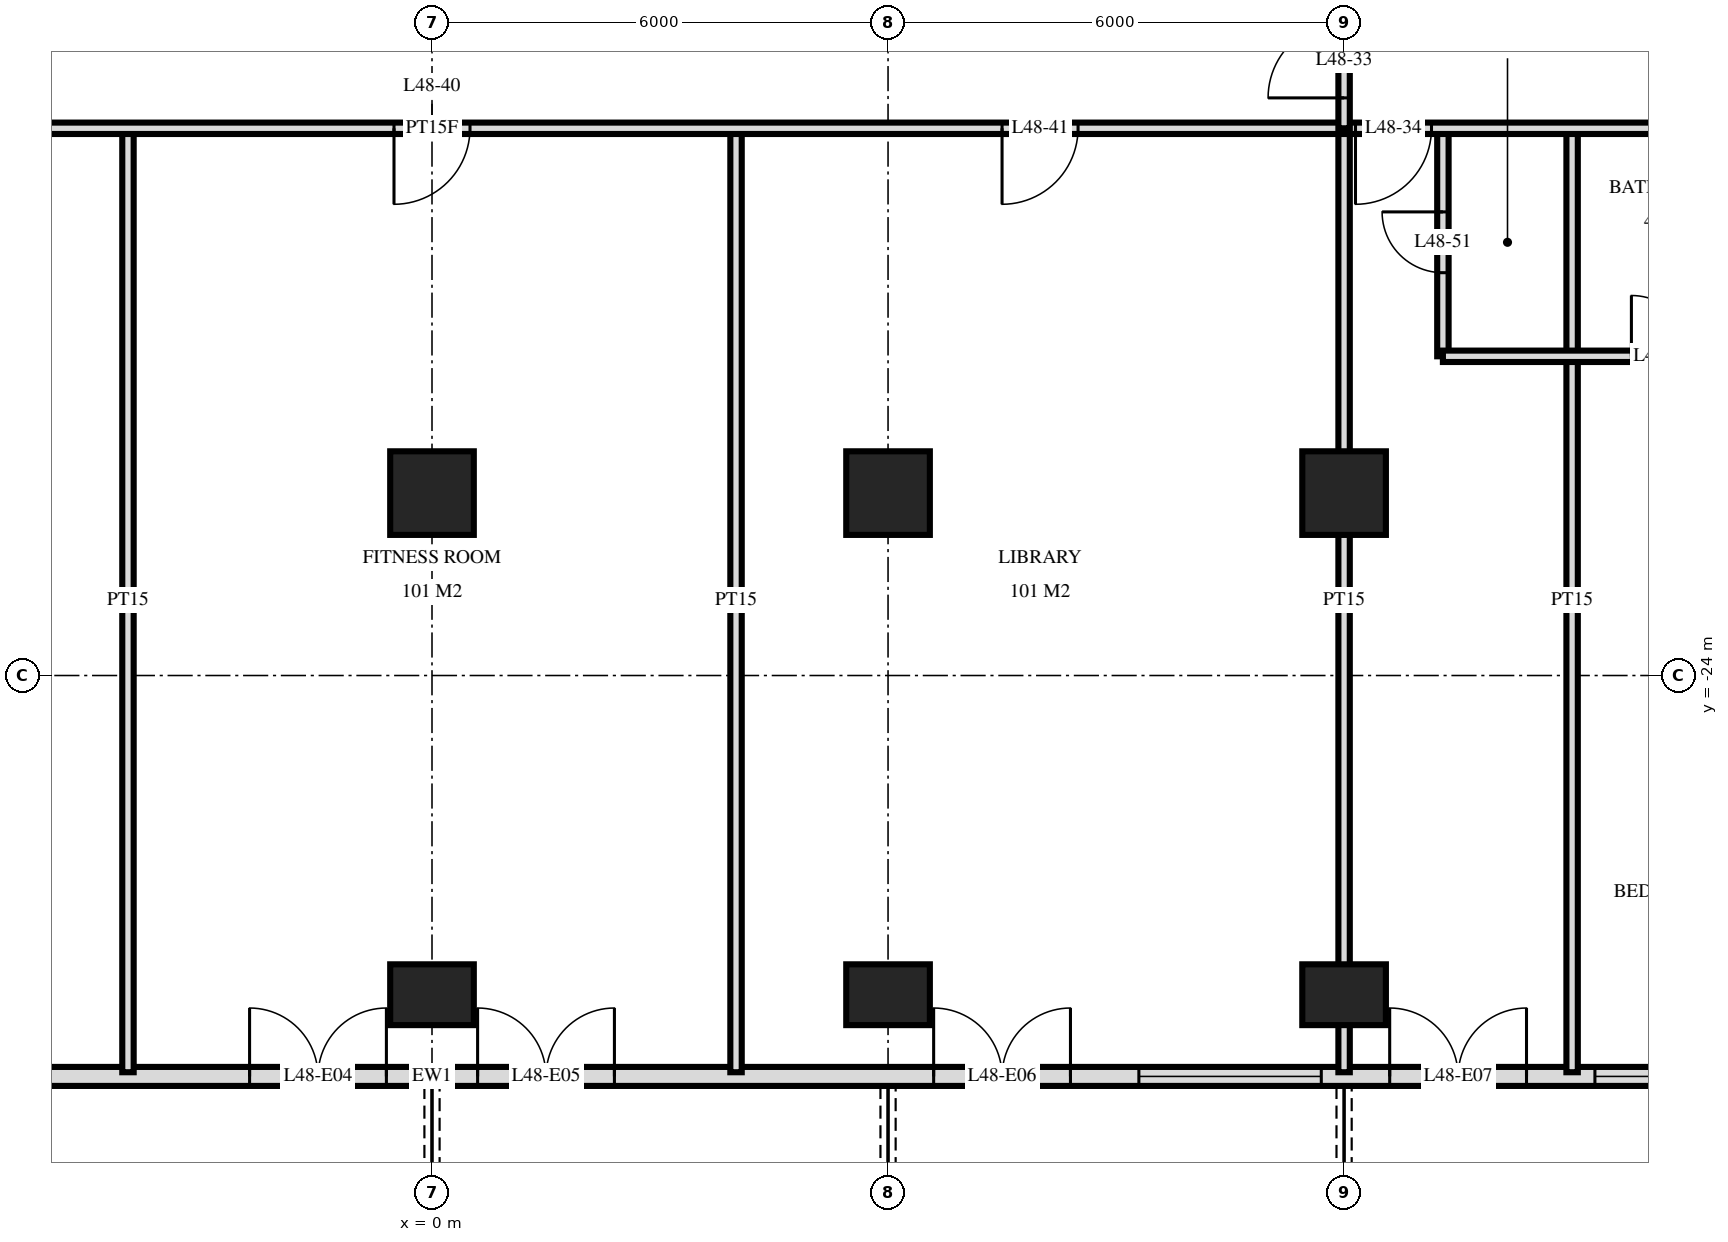
"""IFC4 building model, lengths in metres.
Left out: names, types, materials, properties, quantities, classifications, styles, units other than length and angle.
Written with IfcOpenShell. Run it as: python <this file> out.ifc"""

import sys

from ifc_helpers import new_model, si_unit, direction, frame, frame_2d, origin, origin_2d, place, context, subcontext, project, spatial, rectangle, extrude, element, fill, save


model = new_model("IFC4")
c1 = context("Model", 3, precision=1e-05, world=origin(), true_north=direction((0.0, 1.0)))
c2 = subcontext(c1, "Body", "Model", "MODEL_VIEW")
j1 = project(units=[si_unit("LENGTHUNIT", "METRE"), si_unit("PLANEANGLEUNIT", "RADIAN")], contexts=[c1])
p1 = place(None, origin())
s1 = spatial("IfcSite", under=j1, at=p1, CompositionType="ELEMENT")
p2 = place(p1, origin())
s2 = spatial("IfcBuilding", under=s1, at=p2, CompositionType="ELEMENT")
p3 = place(p2, frame((0.0, 0.0, 187.1)))
s3 = spatial("IfcBuildingStorey", under=s2, at=p3, CompositionType="ELEMENT", Elevation=187.1)
p4 = place(p3, frame((0.0, -28.2, 0.0), z_axis=(0.0, 0.0, 1.0), x_axis=(1.0, 0.0, 0.0)))
e1 = element("IfcColumn", 1, at=p4, inside=s3, PredefinedType="COLUMN", context=c2, shape_type="SweptSolid", body=[
    extrude(rectangle(XDim=1.1, YDim=0.8, at=origin_2d()), origin(), (0.0, 0.0, 1.0), 3.5),
])
p5 = place(p3, frame((0.0, -21.6, 0.0), z_axis=(0.0, 0.0, 1.0), x_axis=(1.0, 0.0, 0.0)))
e2 = element("IfcColumn", 2, at=p5, inside=s3, PredefinedType="COLUMN", context=c2, shape_type="SweptSolid", body=[
    extrude(rectangle(XDim=1.1, YDim=1.1, at=origin_2d()), origin(), (0.0, 0.0, 1.0), 3.5),
])
p6 = place(p3, frame((6.0, -28.2, 0.0), z_axis=(0.0, 0.0, 1.0), x_axis=(1.0, 0.0, 0.0)))
e3 = element("IfcColumn", 3, at=p6, inside=s3, PredefinedType="COLUMN", context=c2, shape_type="SweptSolid", body=[
    extrude(rectangle(XDim=1.1, YDim=0.8, at=origin_2d()), origin(), (0.0, 0.0, 1.0), 3.5),
])
p7 = place(p3, frame((6.0, -21.6, 0.0), z_axis=(0.0, 0.0, 1.0), x_axis=(1.0, 0.0, 0.0)))
e4 = element("IfcColumn", 4, at=p7, inside=s3, PredefinedType="COLUMN", context=c2, shape_type="SweptSolid", body=[
    extrude(rectangle(XDim=1.1, YDim=1.1, at=origin_2d()), origin(), (0.0, 0.0, 1.0), 3.5),
])
p8 = place(p3, frame((12.0, -28.2, 0.0), z_axis=(0.0, 0.0, 1.0), x_axis=(1.0, 0.0, 0.0)))
e5 = element("IfcColumn", 5, at=p8, inside=s3, PredefinedType="COLUMN", context=c2, shape_type="SweptSolid", body=[
    extrude(rectangle(XDim=1.1, YDim=0.8, at=origin_2d()), origin(), (0.0, 0.0, 1.0), 3.5),
])
p9 = place(p3, frame((12.0, -21.6, 0.0), z_axis=(0.0, 0.0, 1.0), x_axis=(1.0, 0.0, 0.0)))
e6 = element("IfcColumn", 6, at=p9, inside=s3, PredefinedType="COLUMN", context=c2, shape_type="SweptSolid", body=[
    extrude(rectangle(XDim=1.1, YDim=1.1, at=origin_2d()), origin(), (0.0, 0.0, 1.0), 3.5),
])
p10 = place(p3, frame((-22.475, -29.275, 0.0), z_axis=(0.0, 0.0, 1.0), x_axis=(1.0, 0.0, 0.0)))
e7 = element("IfcWall", 7, at=p10, inside=s3, PredefinedType="SOLIDWALL", context=c2, shape_type="SweptSolid", body=[
    extrude(rectangle(XDim=44.951, YDim=0.25, at=frame_2d((22.475, 0.0))), origin(), (0.0, 0.0, 1.0), 3.22),
])
p11 = place(p10, frame((0.575, 0.0, 0.0)))
e8 = element("IfcOpeningElement", 8, at=p11, cuts=e7, PredefinedType="OPENING", context=c2, shape_type="SweptSolid", body=[
    extrude(rectangle(XDim=1.8, YDim=2.4, at=frame_2d((0.9, 1.2))), frame((0.0, 0.135, 0.0), z_axis=(0.0, -1.0, 0.0), x_axis=(1.0, 0.0, 0.0)), (0.0, 0.0, 1.0), 0.27),
])
p12 = place(p10, frame((4.775, 0.0, 0.9)))
e9 = element("IfcOpeningElement", 9, at=p12, cuts=e7, PredefinedType="OPENING", context=c2, shape_type="SweptSolid", body=[
    extrude(rectangle(XDim=2.4, YDim=1.5, at=frame_2d((1.2, 0.75))), frame((0.0, 0.135, 0.0), z_axis=(0.0, -1.0, 0.0), x_axis=(1.0, 0.0, 0.0)), (0.0, 0.0, 1.0), 0.27),
])
p13 = place(p10, frame((8.075, 0.0, 0.0)))
e10 = element("IfcOpeningElement", 10, at=p13, cuts=e7, PredefinedType="OPENING", context=c2, shape_type="SweptSolid", body=[
    extrude(rectangle(XDim=1.8, YDim=2.4, at=frame_2d((0.9, 1.2))), frame((0.0, 0.135, 0.0), z_axis=(0.0, -1.0, 0.0), x_axis=(1.0, 0.0, 0.0)), (0.0, 0.0, 1.0), 0.27),
])
p14 = place(p10, frame((11.075, 0.0, 0.0)))
e11 = element("IfcOpeningElement", 11, at=p14, cuts=e7, PredefinedType="OPENING", context=c2, shape_type="SweptSolid", body=[
    extrude(rectangle(XDim=1.8, YDim=2.4, at=frame_2d((0.9, 1.2))), frame((0.0, 0.135, 0.0), z_axis=(0.0, -1.0, 0.0), x_axis=(1.0, 0.0, 0.0)), (0.0, 0.0, 1.0), 0.27),
])
p15 = place(p10, frame((13.775, 0.0, 0.9)))
e12 = element("IfcOpeningElement", 12, at=p15, cuts=e7, PredefinedType="OPENING", context=c2, shape_type="SweptSolid", body=[
    extrude(rectangle(XDim=2.4, YDim=1.5, at=frame_2d((1.2, 0.75))), frame((0.0, 0.135, 0.0), z_axis=(0.0, -1.0, 0.0), x_axis=(1.0, 0.0, 0.0)), (0.0, 0.0, 1.0), 0.27),
])
p16 = place(p10, frame((20.075, 0.0, 0.0)))
e13 = element("IfcOpeningElement", 13, at=p16, cuts=e7, PredefinedType="OPENING", context=c2, shape_type="SweptSolid", body=[
    extrude(rectangle(XDim=1.8, YDim=2.4, at=frame_2d((0.9, 1.2))), frame((0.0, 0.135, 0.0), z_axis=(0.0, -1.0, 0.0), x_axis=(1.0, 0.0, 0.0)), (0.0, 0.0, 1.0), 0.27),
])
p17 = place(p10, frame((23.075, 0.0, 0.0)))
e14 = element("IfcOpeningElement", 14, at=p17, cuts=e7, PredefinedType="OPENING", context=c2, shape_type="SweptSolid", body=[
    extrude(rectangle(XDim=1.8, YDim=2.4, at=frame_2d((0.9, 1.2))), frame((0.0, 0.135, 0.0), z_axis=(0.0, -1.0, 0.0), x_axis=(1.0, 0.0, 0.0)), (0.0, 0.0, 1.0), 0.27),
])
p18 = place(p10, frame((29.075, 0.0, 0.0)))
e15 = element("IfcOpeningElement", 15, at=p18, cuts=e7, PredefinedType="OPENING", context=c2, shape_type="SweptSolid", body=[
    extrude(rectangle(XDim=1.8, YDim=2.4, at=frame_2d((0.9, 1.2))), frame((0.0, 0.135, 0.0), z_axis=(0.0, -1.0, 0.0), x_axis=(1.0, 0.0, 0.0)), (0.0, 0.0, 1.0), 0.27),
])
p19 = place(p10, frame((31.775, 0.0, 0.9)))
e16 = element("IfcOpeningElement", 16, at=p19, cuts=e7, PredefinedType="OPENING", context=c2, shape_type="SweptSolid", body=[
    extrude(rectangle(XDim=2.4, YDim=1.5, at=frame_2d((1.2, 0.75))), frame((0.0, 0.135, 0.0), z_axis=(0.0, -1.0, 0.0), x_axis=(1.0, 0.0, 0.0)), (0.0, 0.0, 1.0), 0.27),
])
p20 = place(p10, frame((35.075, 0.0, 0.0)))
e17 = element("IfcOpeningElement", 17, at=p20, cuts=e7, PredefinedType="OPENING", context=c2, shape_type="SweptSolid", body=[
    extrude(rectangle(XDim=1.8, YDim=2.4, at=frame_2d((0.9, 1.2))), frame((0.0, 0.135, 0.0), z_axis=(0.0, -1.0, 0.0), x_axis=(1.0, 0.0, 0.0)), (0.0, 0.0, 1.0), 0.27),
])
p21 = place(p10, frame((37.775, 0.0, 0.9)))
e18 = element("IfcOpeningElement", 18, at=p21, cuts=e7, PredefinedType="OPENING", context=c2, shape_type="SweptSolid", body=[
    extrude(rectangle(XDim=2.4, YDim=1.5, at=frame_2d((1.2, 0.75))), frame((0.0, 0.135, 0.0), z_axis=(0.0, -1.0, 0.0), x_axis=(1.0, 0.0, 0.0)), (0.0, 0.0, 1.0), 0.27),
])
p22 = place(p10, frame((41.075, 0.0, 0.0)))
e19 = element("IfcOpeningElement", 19, at=p22, cuts=e7, PredefinedType="OPENING", context=c2, shape_type="SweptSolid", body=[
    extrude(rectangle(XDim=1.8, YDim=2.4, at=frame_2d((0.9, 1.2))), frame((0.0, 0.135, 0.0), z_axis=(0.0, -1.0, 0.0), x_axis=(1.0, 0.0, 0.0)), (0.0, 0.0, 1.0), 0.27),
])
p23 = place(p3, frame((15.0, -29.22, 0.0), z_axis=(0.0, 0.0, 1.0), x_axis=(0.0, 1.0, 0.0)))
e20 = element("IfcWall", 20, at=p23, inside=s3, PredefinedType="PARTITIONING", context=c2, shape_type="SweptSolid", body=[
    extrude(rectangle(XDim=12.42, YDim=0.15, at=frame_2d((6.21, 0.0))), origin(), (0.0, 0.0, 1.0), 3.22),
])
p24 = place(p3, frame((13.3, -19.8, 0.0), z_axis=(0.0, 0.0, 1.0), x_axis=(0.0, 1.0, 0.0)))
e21 = element("IfcWall", 21, at=p24, inside=s3, PredefinedType="PARTITIONING", context=c2, shape_type="SweptSolid", body=[
    extrude(rectangle(XDim=3.0, YDim=0.15, at=frame_2d((1.5, 0.0))), origin(), (0.0, 0.0, 1.0), 3.22),
])
p25 = place(p24, frame((1.1, 0.0, 0.0)))
e22 = element("IfcOpeningElement", 22, at=p25, cuts=e21, PredefinedType="OPENING", context=c2, shape_type="SweptSolid", body=[
    extrude(rectangle(XDim=0.8, YDim=2.1, at=frame_2d((0.4, 1.05))), frame((0.0, 0.085, 0.0), z_axis=(0.0, -1.0, 0.0), x_axis=(1.0, 0.0, 0.0)), (0.0, 0.0, 1.0), 0.17),
])
p26 = place(p3, frame((12.0, -16.8, 0.0), z_axis=(0.0, 0.0, 1.0), x_axis=(0.0, 1.0, 0.0)))
e23 = element("IfcWall", 23, at=p26, inside=s3, PredefinedType="PARTITIONING", context=c2, shape_type="SweptSolid", body=[
    extrude(rectangle(XDim=1.75, YDim=0.15, at=frame_2d((0.875, 0.0))), origin(), (0.0, 0.0, 1.0), 3.22),
])
p27 = place(p26, frame((0.4, 0.0, 0.0)))
e24 = element("IfcOpeningElement", 24, at=p27, cuts=e23, PredefinedType="OPENING", context=c2, shape_type="SweptSolid", body=[
    extrude(rectangle(XDim=1.0, YDim=2.1, at=frame_2d((0.5, 1.05))), frame((0.0, 0.085, 0.0), z_axis=(0.0, -1.0, 0.0), x_axis=(1.0, 0.0, 0.0)), (0.0, 0.0, 1.0), 0.17),
])
for number, where, z_axis, x_axis in (
    (25, (12.0, -29.22, 0.0), (0.0, 0.0, 1.0), (0.0, 1.0, 0.0)),
    (26, (4.0, -29.22, 0.0), (0.0, 0.0, 1.0), (0.0, 1.0, 0.0)),
    (27, (-4.0, -29.22, 0.0), (0.0, 0.0, 1.0), (0.0, 1.0, 0.0)),
):
    element("IfcWall", number, at=place(p3, frame(where, z_axis=z_axis, x_axis=x_axis)), inside=s3, PredefinedType="PARTITIONING", context=c2, shape_type="SweptSolid", body=[
        extrude(rectangle(XDim=12.42, YDim=0.15, at=frame_2d((6.21, 0.0))), origin(), (0.0, 0.0, 1.0), 3.22),
    ])
p28 = place(p3, frame((13.3, -19.8, 0.0), z_axis=(0.0, 0.0, 1.0), x_axis=(1.0, 0.0, 0.0)))
e28 = element("IfcWall", 28, at=p28, inside=s3, PredefinedType="PARTITIONING", context=c2, shape_type="SweptSolid", body=[
    extrude(rectangle(XDim=8.1, YDim=0.15, at=frame_2d((4.05, 0.0))), origin(), (0.0, 0.0, 1.0), 3.22),
])
p29 = place(p28, frame((2.48, 0.0, 0.0)))
e29 = element("IfcOpeningElement", 29, at=p29, cuts=e28, PredefinedType="OPENING", context=c2, shape_type="SweptSolid", body=[
    extrude(rectangle(XDim=0.8, YDim=2.1, at=frame_2d((0.4, 1.05))), frame((0.0, 0.085, 0.0), z_axis=(0.0, -1.0, 0.0), x_axis=(1.0, 0.0, 0.0)), (0.0, 0.0, 1.0), 0.17),
])
p30 = place(p28, frame((5.33, 0.0, 0.0)))
e30 = element("IfcOpeningElement", 30, at=p30, cuts=e28, PredefinedType="OPENING", context=c2, shape_type="SweptSolid", body=[
    extrude(rectangle(XDim=0.8, YDim=2.1, at=frame_2d((0.4, 1.05))), frame((0.0, 0.085, 0.0), z_axis=(0.0, -1.0, 0.0), x_axis=(1.0, 0.0, 0.0)), (0.0, 0.0, 1.0), 0.17),
])
p31 = place(p3, frame((-26.82, -16.8, 0.0), z_axis=(0.0, 0.0, 1.0), x_axis=(1.0, 0.0, 0.0)))
e31 = element("IfcWall", 31, at=p31, inside=s3, PredefinedType="PARTITIONING", context=c2, shape_type="SweptSolid", body=[
    extrude(rectangle(XDim=53.64, YDim=0.15, at=frame_2d((26.82, 0.0))), origin(), (0.0, 0.0, 1.0), 3.22),
])
p32 = place(p31, frame((11.97, 0.0, 0.0)))
e32 = element("IfcOpeningElement", 32, at=p32, cuts=e31, PredefinedType="OPENING", context=c2, shape_type="SweptSolid", body=[
    extrude(rectangle(XDim=1.0, YDim=2.1, at=frame_2d((0.5, 1.05))), frame((0.0, 0.085, 0.0), z_axis=(0.0, -1.0, 0.0), x_axis=(1.0, 0.0, 0.0)), (0.0, 0.0, 1.0), 0.17),
])
p33 = place(p31, frame((10.67, 0.0, 0.0)))
e33 = element("IfcOpeningElement", 33, at=p33, cuts=e31, PredefinedType="OPENING", context=c2, shape_type="SweptSolid", body=[
    extrude(rectangle(XDim=1.0, YDim=2.1, at=frame_2d((0.5, 1.05))), frame((0.0, 0.085, 0.0), z_axis=(0.0, -1.0, 0.0), x_axis=(1.0, 0.0, 0.0)), (0.0, 0.0, 1.0), 0.17),
])
p34 = place(p31, frame((3.22, 0.0, 0.0)))
e34 = element("IfcOpeningElement", 34, at=p34, cuts=e31, PredefinedType="OPENING", context=c2, shape_type="SweptSolid", body=[
    extrude(rectangle(XDim=1.0, YDim=2.1, at=frame_2d((0.5, 1.05))), frame((0.0, 0.085, 0.0), z_axis=(0.0, -1.0, 0.0), x_axis=(1.0, 0.0, 0.0)), (0.0, 0.0, 1.0), 0.17),
])
p35 = place(p31, frame((5.02, 0.0, 0.0)))
e35 = element("IfcOpeningElement", 35, at=p35, cuts=e31, PredefinedType="OPENING", context=c2, shape_type="SweptSolid", body=[
    extrude(rectangle(XDim=1.0, YDim=2.1, at=frame_2d((0.5, 1.05))), frame((0.0, 0.085, 0.0), z_axis=(0.0, -1.0, 0.0), x_axis=(1.0, 0.0, 0.0)), (0.0, 0.0, 1.0), 0.17),
])
p36 = place(p31, frame((38.97, 0.0, 0.0)))
e36 = element("IfcOpeningElement", 36, at=p36, cuts=e31, PredefinedType="OPENING", context=c2, shape_type="SweptSolid", body=[
    extrude(rectangle(XDim=1.0, YDim=2.1, at=frame_2d((0.5, 1.05))), frame((0.0, 0.085, 0.0), z_axis=(0.0, -1.0, 0.0), x_axis=(1.0, 0.0, 0.0)), (0.0, 0.0, 1.0), 0.17),
])
p37 = place(p31, frame((48.72, 0.0, 0.0)))
e37 = element("IfcOpeningElement", 37, at=p37, cuts=e31, PredefinedType="OPENING", context=c2, shape_type="SweptSolid", body=[
    extrude(rectangle(XDim=1.0, YDim=2.1, at=frame_2d((0.5, 1.05))), frame((0.0, 0.085, 0.0), z_axis=(0.0, -1.0, 0.0), x_axis=(1.0, 0.0, 0.0)), (0.0, 0.0, 1.0), 0.17),
])
p38 = place(p31, frame((46.92, 0.0, 0.0)))
e38 = element("IfcOpeningElement", 38, at=p38, cuts=e31, PredefinedType="OPENING", context=c2, shape_type="SweptSolid", body=[
    extrude(rectangle(XDim=1.0, YDim=2.1, at=frame_2d((0.5, 1.05))), frame((0.0, 0.085, 0.0), z_axis=(0.0, -1.0, 0.0), x_axis=(1.0, 0.0, 0.0)), (0.0, 0.0, 1.0), 0.17),
])
p39 = place(p31, frame((18.32, 0.0, 0.0)))
e39 = element("IfcOpeningElement", 39, at=p39, cuts=e31, PredefinedType="OPENING", context=c2, shape_type="SweptSolid", body=[
    extrude(rectangle(XDim=1.0, YDim=2.1, at=frame_2d((0.5, 1.05))), frame((0.0, 0.085, 0.0), z_axis=(0.0, -1.0, 0.0), x_axis=(1.0, 0.0, 0.0)), (0.0, 0.0, 1.0), 0.17),
])
p40 = place(p31, frame((26.32, 0.0, 0.0)))
e40 = element("IfcOpeningElement", 40, at=p40, cuts=e31, PredefinedType="OPENING", context=c2, shape_type="SweptSolid", body=[
    extrude(rectangle(XDim=1.0, YDim=2.1, at=frame_2d((0.5, 1.05))), frame((0.0, 0.085, 0.0), z_axis=(0.0, -1.0, 0.0), x_axis=(1.0, 0.0, 0.0)), (0.0, 0.0, 1.0), 0.17),
])
p41 = place(p31, frame((34.32, 0.0, 0.0)))
e41 = element("IfcOpeningElement", 41, at=p41, cuts=e31, PredefinedType="OPENING", context=c2, shape_type="SweptSolid", body=[
    extrude(rectangle(XDim=1.0, YDim=2.1, at=frame_2d((0.5, 1.05))), frame((0.0, 0.085, 0.0), z_axis=(0.0, -1.0, 0.0), x_axis=(1.0, 0.0, 0.0)), (0.0, 0.0, 1.0), 0.17),
])
p42 = place(p16, origin())
e42 = element("IfcDoor", 42, at=p42, inside=s3, OperationType="DOUBLE_DOOR_SINGLE_SWING", PredefinedType="DOOR", context=c2, shape_type="SweptSolid", body=[
    extrude(rectangle(XDim=1.8, YDim=2.4, at=frame_2d((0.9, 1.2))), frame((0.0, 0.025, 0.0), z_axis=(0.0, -1.0, 0.0), x_axis=(1.0, 0.0, 0.0)), (0.0, 0.0, 1.0), 0.05),
])
fill(e13, e42)
p43 = place(p17, origin())
e43 = element("IfcDoor", 43, at=p43, inside=s3, OperationType="DOUBLE_DOOR_SINGLE_SWING", PredefinedType="DOOR", context=c2, shape_type="SweptSolid", body=[
    extrude(rectangle(XDim=1.8, YDim=2.4, at=frame_2d((0.9, 1.2))), frame((0.0, 0.025, 0.0), z_axis=(0.0, -1.0, 0.0), x_axis=(1.0, 0.0, 0.0)), (0.0, 0.0, 1.0), 0.05),
])
fill(e14, e43)
p44 = place(p18, origin())
e44 = element("IfcDoor", 44, at=p44, inside=s3, OperationType="DOUBLE_DOOR_SINGLE_SWING", PredefinedType="DOOR", context=c2, shape_type="SweptSolid", body=[
    extrude(rectangle(XDim=1.8, YDim=2.4, at=frame_2d((0.9, 1.2))), frame((0.0, 0.025, 0.0), z_axis=(0.0, -1.0, 0.0), x_axis=(1.0, 0.0, 0.0)), (0.0, 0.0, 1.0), 0.05),
])
fill(e15, e44)
p45 = place(p19, origin())
e45 = element("IfcWindow", 45, at=p45, inside=s3, PartitioningType="SINGLE_PANEL", PredefinedType="WINDOW", context=c2, shape_type="SweptSolid", body=[
    extrude(rectangle(XDim=2.4, YDim=1.5, at=frame_2d((1.2, 0.75))), frame((0.0, 0.03, 0.0), z_axis=(0.0, -1.0, 0.0), x_axis=(1.0, 0.0, 0.0)), (0.0, 0.0, 1.0), 0.06),
])
fill(e16, e45)
p46 = place(p20, origin())
e46 = element("IfcDoor", 46, at=p46, inside=s3, OperationType="DOUBLE_DOOR_SINGLE_SWING", PredefinedType="DOOR", context=c2, shape_type="SweptSolid", body=[
    extrude(rectangle(XDim=1.8, YDim=2.4, at=frame_2d((0.9, 1.2))), frame((0.0, 0.025, 0.0), z_axis=(0.0, -1.0, 0.0), x_axis=(1.0, 0.0, 0.0)), (0.0, 0.0, 1.0), 0.05),
])
fill(e17, e46)
p47 = place(p21, origin())
e47 = element("IfcWindow", 47, at=p47, inside=s3, PartitioningType="SINGLE_PANEL", PredefinedType="WINDOW", context=c2, shape_type="SweptSolid", body=[
    extrude(rectangle(XDim=2.4, YDim=1.5, at=frame_2d((1.2, 0.75))), frame((0.0, 0.03, 0.0), z_axis=(0.0, -1.0, 0.0), x_axis=(1.0, 0.0, 0.0)), (0.0, 0.0, 1.0), 0.06),
])
fill(e18, e47)
p48 = place(p27, origin())
e48 = element("IfcDoor", 48, at=p48, inside=s3, OperationType="SINGLE_SWING_RIGHT", PredefinedType="DOOR", context=c2, shape_type="SweptSolid", body=[
    extrude(rectangle(XDim=1.0, YDim=2.1, at=frame_2d((0.5, 1.05))), frame((0.0, 0.025, 0.0), z_axis=(0.0, -1.0, 0.0), x_axis=(1.0, 0.0, 0.0)), (0.0, 0.0, 1.0), 0.05),
])
fill(e24, e48)
p49 = place(p36, frame((0.5, 0.0, 0.0), z_axis=(0.0, 0.0, 1.0), x_axis=(-1.0, 0.0, 0.0)))
e49 = element("IfcDoor", 49, at=p49, inside=s3, OperationType="SINGLE_SWING_LEFT", PredefinedType="DOOR", context=c2, shape_type="SweptSolid", body=[
    extrude(rectangle(XDim=1.0, YDim=2.1, at=frame_2d((0.0, 1.05))), frame((0.0, -0.025, 0.0), z_axis=(0.0, 1.0, 0.0), x_axis=(-1.0, 0.0, 0.0)), (0.0, 0.0, 1.0), 0.05),
])
fill(e36, e49)
p50 = place(p40, frame((0.5, 0.0, 0.0), z_axis=(0.0, 0.0, 1.0), x_axis=(-1.0, 0.0, 0.0)))
e50 = element("IfcDoor", 50, at=p50, inside=s3, OperationType="SINGLE_SWING_LEFT", PredefinedType="DOOR", context=c2, shape_type="SweptSolid", body=[
    extrude(rectangle(XDim=1.0, YDim=2.1, at=frame_2d((0.0, 1.05))), frame((0.0, -0.025, 0.0), z_axis=(0.0, 1.0, 0.0), x_axis=(-1.0, 0.0, 0.0)), (0.0, 0.0, 1.0), 0.05),
])
fill(e40, e50)
p51 = place(p41, frame((0.5, 0.0, 0.0), z_axis=(0.0, 0.0, 1.0), x_axis=(-1.0, 0.0, 0.0)))
e51 = element("IfcDoor", 51, at=p51, inside=s3, OperationType="SINGLE_SWING_LEFT", PredefinedType="DOOR", context=c2, shape_type="SweptSolid", body=[
    extrude(rectangle(XDim=1.0, YDim=2.1, at=frame_2d((0.0, 1.05))), frame((0.0, -0.025, 0.0), z_axis=(0.0, 1.0, 0.0), x_axis=(-1.0, 0.0, 0.0)), (0.0, 0.0, 1.0), 0.05),
])
fill(e41, e51)
p52 = place(p25, origin())
e52 = element("IfcDoor", 52, at=p52, inside=s3, OperationType="SINGLE_SWING_LEFT", PredefinedType="DOOR", context=c2, shape_type="SweptSolid", body=[
    extrude(rectangle(XDim=0.8, YDim=2.1, at=frame_2d((0.4, 1.05))), frame((0.0, 0.025, 0.0), z_axis=(0.0, -1.0, 0.0), x_axis=(1.0, 0.0, 0.0)), (0.0, 0.0, 1.0), 0.05),
])
fill(e22, e52)
p53 = place(p29, origin())
e53 = element("IfcDoor", 53, at=p53, inside=s3, OperationType="SINGLE_SWING_RIGHT", PredefinedType="DOOR", context=c2, shape_type="SweptSolid", body=[
    extrude(rectangle(XDim=0.8, YDim=2.1, at=frame_2d((0.4, 1.05))), frame((0.0, 0.025, 0.0), z_axis=(0.0, -1.0, 0.0), x_axis=(1.0, 0.0, 0.0)), (0.0, 0.0, 1.0), 0.05),
])
fill(e29, e53)
save(model, sys.argv[1])
